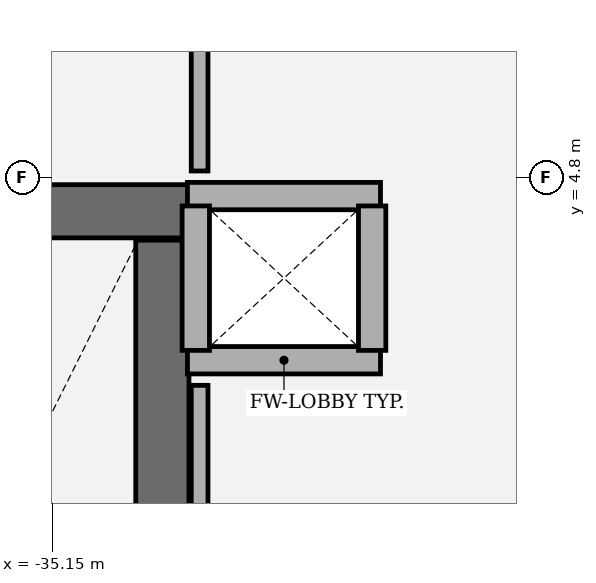
"""IFC4 building model, lengths in metres.
Left out: names, types, materials, properties, quantities, classifications, styles, units other than length and angle.
Written with IfcOpenShell. Run it as: python <this file> out.ifc"""

import sys

from ifc_helpers import new_model, si_unit, direction, frame, frame_2d, origin, place, context, subcontext, project, spatial, rectangle, extrude, element, save


model = new_model("IFC4")
c1 = context("Model", 3, precision=1e-05, world=origin(), true_north=direction((0.0, 1.0)))
c2 = subcontext(c1, "Body", "Model", "MODEL_VIEW")
j1 = project(units=[si_unit("LENGTHUNIT", "METRE"), si_unit("PLANEANGLEUNIT", "RADIAN")], contexts=[c1])
p1 = place(None, origin())
s1 = spatial("IfcSite", under=j1, at=p1, CompositionType="ELEMENT")
p2 = place(p1, origin())
s2 = spatial("IfcBuilding", under=s1, at=p2, CompositionType="ELEMENT")
p3 = place(p2, frame((0.0, 0.0, 49.2)))
s3 = spatial("IfcBuildingStorey", under=s2, at=p3, CompositionType="ELEMENT", Elevation=49.2)
p4 = place(p3, frame((-34.25, 4.575, 0.0), z_axis=(0.0, 0.0, 1.0), x_axis=(-1.0, 0.0, 0.0)))
e1 = element("IfcWall", 1, at=p4, inside=s3, PredefinedType="SHEAR", context=c2, shape_type="SweptSolid", body=[
    extrude(rectangle(XDim=4.21, YDim=0.35, at=frame_2d((2.105, 0.0))), origin(), (0.0, 0.0, 1.0), 3.92),
])
p5 = place(p3, frame((-34.425, -4.385, 0.0), z_axis=(0.0, 0.0, 1.0), x_axis=(0.0, 1.0, 0.0)))
e2 = element("IfcWall", 2, at=p5, inside=s3, PredefinedType="SHEAR", context=c2, shape_type="SweptSolid", body=[
    extrude(rectangle(XDim=8.77, YDim=0.35, at=frame_2d((4.385, 0.0))), origin(), (0.0, 0.0, 1.0), 3.92),
])
for number, where, z_axis, x_axis in (
    (3, (-32.99, 3.595, 0.0), (0.0, 0.0, 1.0), (-1.0, 0.0, 0.0)),
    (4, (-34.26, 4.675, 0.0), (0.0, 0.0, 1.0), (1.0, 0.0, 0.0)),
):
    element("IfcWall", number, at=place(p3, frame(where, z_axis=z_axis, x_axis=x_axis)), inside=s3, PredefinedType="PARTITIONING", context=c2, shape_type="SweptSolid", body=[
        extrude(rectangle(XDim=1.27, YDim=0.18, at=frame_2d((0.635, 0.0))), origin(), (0.0, 0.0, 1.0), 3.92),
    ])
for number, where, z_axis, x_axis in (
    (5, (-34.205, 3.66, 0.0), (0.0, 0.0, 1.0), (0.0, 1.0, 0.0)),
    (6, (-33.045, 4.61, 0.0), (0.0, 0.0, 1.0), (0.0, -1.0, 0.0)),
):
    element("IfcWall", number, at=place(p3, frame(where, z_axis=z_axis, x_axis=x_axis)), inside=s3, PredefinedType="PARTITIONING", context=c2, shape_type="SweptSolid", body=[
        extrude(rectangle(XDim=0.95, YDim=0.18, at=frame_2d((0.475, 0.0))), origin(), (0.0, 0.0, 1.0), 3.92),
    ])
p6 = place(p3, frame((-34.18, 8.225, 0.0), z_axis=(0.0, 0.0, 1.0), x_axis=(0.0, -1.0, 0.0)))
e7 = element("IfcWall", 7, at=p6, inside=s3, PredefinedType="PARTITIONING", context=c2, shape_type="SweptSolid", body=[
    extrude(rectangle(XDim=3.385, YDim=0.11, at=frame_2d((1.692, 0.0))), origin(), (0.0, 0.0, 1.0), 3.92),
])
p7 = place(p6, frame((1.252, 0.0, 0.0)))
e8 = element("IfcOpeningElement", 8, at=p7, cuts=e7, PredefinedType="OPENING", context=c2, shape_type="SweptSolid", body=[
    extrude(rectangle(XDim=0.88, YDim=2.1, at=frame_2d((0.44, 1.05))), frame((0.0, 0.065, 0.0), z_axis=(0.0, -1.0, 0.0), x_axis=(1.0, 0.0, 0.0)), (0.0, 0.0, 1.0), 0.13),
])
p8 = place(p3, frame((-34.18, 3.43, 0.0), z_axis=(0.0, 0.0, 1.0), x_axis=(0.0, -1.0, 0.0)))
e9 = element("IfcWall", 9, at=p8, inside=s3, PredefinedType="PARTITIONING", context=c2, shape_type="SweptSolid", body=[
    extrude(rectangle(XDim=1.805, YDim=0.11, at=frame_2d((0.902, 0.0))), origin(), (0.0, 0.0, 1.0), 3.92),
])
save(model, sys.argv[1])
